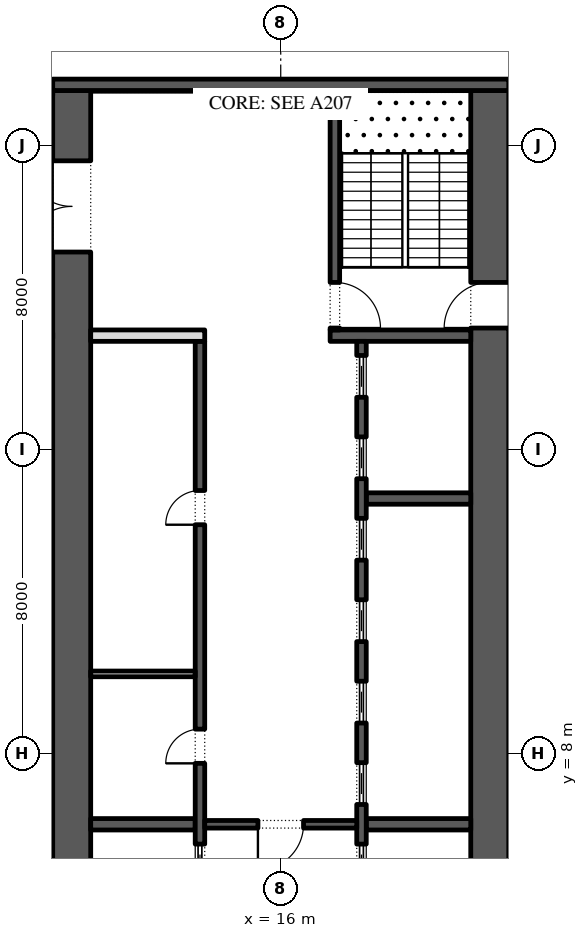
"""IFC4 building model, lengths in metres.
Left out: names, types, materials, properties, quantities, classifications, styles, units other than length and angle.
Written with IfcOpenShell. Run it as: python <this file> out.ifc"""

import sys

from ifc_helpers import new_model, si_unit, direction, frame, frame_2d, origin, place, context, subcontext, project, spatial, rectangle, extrude, element, fill, save


model = new_model("IFC4")
c1 = context("Model", 3, precision=1e-05, world=origin(), true_north=direction((0.0, 1.0)))
c2 = subcontext(c1, "Body", "Model", "MODEL_VIEW")
j1 = project(units=[si_unit("LENGTHUNIT", "METRE"), si_unit("PLANEANGLEUNIT", "RADIAN")], contexts=[c1])
p1 = place(None, origin())
s1 = spatial("IfcSite", under=j1, at=p1, CompositionType="ELEMENT")
p2 = place(p1, origin())
s2 = spatial("IfcBuilding", under=s1, at=p2, CompositionType="ELEMENT")
p3 = place(p2, frame((0.0, 0.0, 24.0)))
s3 = spatial("IfcBuildingStorey", under=s2, at=p3, CompositionType="ELEMENT", Elevation=24.0)
p4 = place(p3, frame((21.5, -2.45, 0.0), z_axis=(0.0, 0.0, 1.0), x_axis=(0.0, 1.0, 0.0)))
e1 = element("IfcWall", 1, at=p4, inside=s3, PredefinedType="SHEAR", context=c2, shape_type="SweptSolid", body=[
    extrude(rectangle(XDim=27.9, YDim=1.0, at=frame_2d((13.95, 0.0))), origin(), (0.0, 0.0, 1.0), 4.5),
])
p5 = place(p4, frame((5.05, 0.0, 0.0)))
e2 = element("IfcOpeningElement", 2, at=p5, cuts=e1, PredefinedType="OPENING", context=c2, shape_type="SweptSolid", body=[
    extrude(rectangle(XDim=1.2, YDim=2.1, at=frame_2d((0.6, 1.05))), frame((0.0, 0.51, 0.0), z_axis=(0.0, -1.0, 0.0), x_axis=(1.0, 0.0, 0.0)), (0.0, 0.0, 1.0), 1.02),
])
p6 = place(p4, frame((21.65, 0.0, 0.0)))
e3 = element("IfcOpeningElement", 3, at=p6, cuts=e1, PredefinedType="OPENING", context=c2, shape_type="SweptSolid", body=[
    extrude(rectangle(XDim=1.2, YDim=2.1, at=frame_2d((0.6, 1.05))), frame((0.0, 0.51, 0.0), z_axis=(0.0, -1.0, 0.0), x_axis=(1.0, 0.0, 0.0)), (0.0, 0.0, 1.0), 1.02),
])
p7 = place(p3, frame((10.5, -2.45, 0.0), z_axis=(0.0, 0.0, 1.0), x_axis=(0.0, 1.0, 0.0)))
e4 = element("IfcWall", 4, at=p7, inside=s3, PredefinedType="SHEAR", context=c2, shape_type="SweptSolid", body=[
    extrude(rectangle(XDim=27.9, YDim=1.0, at=frame_2d((13.95, 0.0))), origin(), (0.0, 0.0, 1.0), 4.5),
])
p8 = place(p7, frame((23.65, 0.0, 0.0)))
e5 = element("IfcOpeningElement", 5, at=p8, cuts=e4, PredefinedType="OPENING", context=c2, shape_type="SweptSolid", body=[
    extrude(rectangle(XDim=2.4, YDim=2.1, at=frame_2d((1.2, 1.05))), frame((0.0, 0.51, 0.0), z_axis=(0.0, -1.0, 0.0), x_axis=(1.0, 0.0, 0.0)), (0.0, 0.0, 1.0), 1.02),
])
p9 = place(p7, frame((2.7, 0.0, 0.0)))
e6 = element("IfcOpeningElement", 6, at=p9, cuts=e4, PredefinedType="OPENING", context=c2, shape_type="SweptSolid", body=[
    extrude(rectangle(XDim=0.9, YDim=2.1, at=frame_2d((0.45, 1.05))), frame((0.0, 0.51, 0.0), z_axis=(0.0, -1.0, 0.0), x_axis=(1.0, 0.0, 0.0)), (0.0, 0.0, 1.0), 1.02),
])
p10 = place(p3, frame((10.0, 25.6, 0.0), z_axis=(0.0, 0.0, 1.0), x_axis=(1.0, 0.0, 0.0)))
e7 = element("IfcWall", 7, at=p10, inside=s3, PredefinedType="SHEAR", context=c2, shape_type="SweptSolid", body=[
    extrude(rectangle(XDim=12.0, YDim=0.3, at=frame_2d((6.0, 0.0))), origin(), (0.0, 0.0, 1.0), 4.5),
])
p11 = place(p3, frame((17.3, 19.0, 0.0), z_axis=(0.0, 0.0, 1.0), x_axis=(1.0, 0.0, 0.0)))
e8 = element("IfcWall", 8, at=p11, inside=s3, PredefinedType="SHEAR", context=c2, shape_type="SweptSolid", body=[
    extrude(rectangle(XDim=3.7, YDim=0.3, at=frame_2d((1.85, 0.0))), origin(), (0.0, 0.0, 1.0), 4.5),
])
p12 = place(p3, frame((17.425, 19.15, 0.0), z_axis=(0.0, 0.0, 1.0), x_axis=(0.0, 1.0, 0.0)))
e9 = element("IfcWall", 9, at=p12, inside=s3, PredefinedType="SHEAR", context=c2, shape_type="SweptSolid", body=[
    extrude(rectangle(XDim=6.3, YDim=0.25, at=frame_2d((3.15, 0.0))), origin(), (0.0, 0.0, 1.0), 4.5),
])
p13 = place(p12, frame((0.05, 0.0, 0.0)))
e10 = element("IfcOpeningElement", 10, at=p13, cuts=e9, PredefinedType="OPENING", context=c2, shape_type="SweptSolid", body=[
    extrude(rectangle(XDim=1.2, YDim=2.1, at=frame_2d((0.6, 1.05))), frame((0.0, 0.135, 0.0), z_axis=(0.0, -1.0, 0.0), x_axis=(1.0, 0.0, 0.0)), (0.0, 0.0, 1.0), 0.27),
])
for number, where, z_axis, x_axis in (
    (11, (18.25, 6.143, 0.0), (0.0, 0.0, 1.0), (1.0, 0.0, 0.0)),
    (12, (18.25, 14.714, 0.0), (0.0, 0.0, 1.0), (1.0, 0.0, 0.0)),
):
    element("IfcWall", number, at=place(p3, frame(where, z_axis=z_axis, x_axis=x_axis)), inside=s3, PredefinedType="SHEAR", context=c2, shape_type="SweptSolid", body=[
        extrude(rectangle(XDim=2.75, YDim=0.3, at=frame_2d((1.375, 0.0))), origin(), (0.0, 0.0, 1.0), 4.5),
    ])
p14 = place(p3, frame((18.125, 4.15, 0.0), z_axis=(0.0, 0.0, 1.0), x_axis=(0.0, 1.0, 0.0)))
e13 = element("IfcWall", 13, at=p14, inside=s3, PredefinedType="SHEAR", context=c2, shape_type="SweptSolid", body=[
    extrude(rectangle(XDim=14.7, YDim=0.25, at=frame_2d((7.35, 0.0))), origin(), (0.0, 0.0, 1.0), 4.5),
])
p15 = place(p14, frame((0.371, 0.0, 0.0)))
e14 = element("IfcOpeningElement", 14, at=p15, cuts=e13, PredefinedType="OPENING", context=c2, shape_type="SweptSolid", body=[
    extrude(rectangle(XDim=1.1, YDim=2.1, at=frame_2d((0.55, 1.05))), frame((0.0, 0.135, 0.0), z_axis=(0.0, -1.0, 0.0), x_axis=(1.0, 0.0, 0.0)), (0.0, 0.0, 1.0), 0.27),
])
p16 = place(p14, frame((2.514, 0.0, 0.0)))
e15 = element("IfcOpeningElement", 15, at=p16, cuts=e13, PredefinedType="OPENING", context=c2, shape_type="SweptSolid", body=[
    extrude(rectangle(XDim=1.1, YDim=2.1, at=frame_2d((0.55, 1.05))), frame((0.0, 0.135, 0.0), z_axis=(0.0, -1.0, 0.0), x_axis=(1.0, 0.0, 0.0)), (0.0, 0.0, 1.0), 0.27),
])
p17 = place(p14, frame((4.657, 0.0, 0.0)))
e16 = element("IfcOpeningElement", 16, at=p17, cuts=e13, PredefinedType="OPENING", context=c2, shape_type="SweptSolid", body=[
    extrude(rectangle(XDim=1.1, YDim=2.1, at=frame_2d((0.55, 1.05))), frame((0.0, 0.135, 0.0), z_axis=(0.0, -1.0, 0.0), x_axis=(1.0, 0.0, 0.0)), (0.0, 0.0, 1.0), 0.27),
])
p18 = place(p14, frame((6.8, 0.0, 0.0)))
e17 = element("IfcOpeningElement", 17, at=p18, cuts=e13, PredefinedType="OPENING", context=c2, shape_type="SweptSolid", body=[
    extrude(rectangle(XDim=1.1, YDim=2.1, at=frame_2d((0.55, 1.05))), frame((0.0, 0.135, 0.0), z_axis=(0.0, -1.0, 0.0), x_axis=(1.0, 0.0, 0.0)), (0.0, 0.0, 1.0), 0.27),
])
p19 = place(p14, frame((8.943, 0.0, 0.0)))
e18 = element("IfcOpeningElement", 18, at=p19, cuts=e13, PredefinedType="OPENING", context=c2, shape_type="SweptSolid", body=[
    extrude(rectangle(XDim=1.1, YDim=2.1, at=frame_2d((0.55, 1.05))), frame((0.0, 0.135, 0.0), z_axis=(0.0, -1.0, 0.0), x_axis=(1.0, 0.0, 0.0)), (0.0, 0.0, 1.0), 0.27),
])
p20 = place(p14, frame((11.086, 0.0, 0.0)))
e19 = element("IfcOpeningElement", 19, at=p20, cuts=e13, PredefinedType="OPENING", context=c2, shape_type="SweptSolid", body=[
    extrude(rectangle(XDim=1.1, YDim=2.1, at=frame_2d((0.55, 1.05))), frame((0.0, 0.135, 0.0), z_axis=(0.0, -1.0, 0.0), x_axis=(1.0, 0.0, 0.0)), (0.0, 0.0, 1.0), 0.27),
])
p21 = place(p14, frame((13.229, 0.0, 0.0)))
e20 = element("IfcOpeningElement", 20, at=p21, cuts=e13, PredefinedType="OPENING", context=c2, shape_type="SweptSolid", body=[
    extrude(rectangle(XDim=1.1, YDim=2.1, at=frame_2d((0.55, 1.05))), frame((0.0, 0.135, 0.0), z_axis=(0.0, -1.0, 0.0), x_axis=(1.0, 0.0, 0.0)), (0.0, 0.0, 1.0), 0.27),
])
p22 = place(p3, frame((11.0, 6.143, 0.0), z_axis=(0.0, 0.0, 1.0), x_axis=(1.0, 0.0, 0.0)))
e21 = element("IfcWall", 21, at=p22, inside=s3, PredefinedType="SHEAR", context=c2, shape_type="SweptSolid", body=[
    extrude(rectangle(XDim=2.75, YDim=0.3, at=frame_2d((1.375, 0.0))), origin(), (0.0, 0.0, 1.0), 4.5),
])
p23 = place(p3, frame((13.875, -2.45, 0.0), z_axis=(0.0, 0.0, 1.0), x_axis=(0.0, 1.0, 0.0)))
e22 = element("IfcWall", 22, at=p23, inside=s3, PredefinedType="SHEAR", context=c2, shape_type="SweptSolid", body=[
    extrude(rectangle(XDim=21.3, YDim=0.25, at=frame_2d((10.65, 0.0))), origin(), (0.0, 0.0, 1.0), 4.5),
])
p24 = place(p23, frame((10.196, 0.0, 0.0)))
e23 = element("IfcOpeningElement", 23, at=p24, cuts=e22, PredefinedType="OPENING", context=c2, shape_type="SweptSolid", body=[
    extrude(rectangle(XDim=0.9, YDim=2.1, at=frame_2d((0.45, 1.05))), frame((0.0, 0.135, 0.0), z_axis=(0.0, -1.0, 0.0), x_axis=(1.0, 0.0, 0.0)), (0.0, 0.0, 1.0), 0.27),
])
p25 = place(p23, frame((16.475, 0.0, 0.0)))
e24 = element("IfcOpeningElement", 24, at=p25, cuts=e22, PredefinedType="OPENING", context=c2, shape_type="SweptSolid", body=[
    extrude(rectangle(XDim=0.9, YDim=2.1, at=frame_2d((0.45, 1.05))), frame((0.0, 0.135, 0.0), z_axis=(0.0, -1.0, 0.0), x_axis=(1.0, 0.0, 0.0)), (0.0, 0.0, 1.0), 0.27),
])
p26 = place(p23, frame((6.971, 0.0, 0.0)))
e25 = element("IfcOpeningElement", 25, at=p26, cuts=e22, PredefinedType="OPENING", context=c2, shape_type="SweptSolid", body=[
    extrude(rectangle(XDim=1.1, YDim=2.1, at=frame_2d((0.55, 1.05))), frame((0.0, 0.135, 0.0), z_axis=(0.0, -1.0, 0.0), x_axis=(1.0, 0.0, 0.0)), (0.0, 0.0, 1.0), 0.27),
])
p27 = place(p3, frame((11.0, 19.0, 0.0), z_axis=(0.0, 0.0, 1.0), x_axis=(1.0, 0.0, 0.0)))
e26 = element("IfcWall", 26, at=p27, inside=s3, PredefinedType="PARTITIONING", context=c2, shape_type="SweptSolid", body=[
    extrude(rectangle(XDim=3.0, YDim=0.3, at=frame_2d((1.5, 0.0))), origin(), (0.0, 0.0, 1.0), 4.5),
])
p28 = place(p3, frame((11.0, 10.1, 0.0), z_axis=(0.0, 0.0, 1.0), x_axis=(1.0, 0.0, 0.0)))
e27 = element("IfcWall", 27, at=p28, inside=s3, PredefinedType="PARTITIONING", context=c2, shape_type="SweptSolid", body=[
    extrude(rectangle(XDim=2.75, YDim=0.15, at=frame_2d((1.375, 0.0))), origin(), (0.0, 0.0, 1.0), 4.5),
])
p29 = place(p3, frame((14.0, 6.143, 0.0), z_axis=(0.0, 0.0, 1.0), x_axis=(1.0, 0.0, 0.0)))
e28 = element("IfcWall", 28, at=p29, inside=s3, PredefinedType="SHEAR", context=c2, shape_type="SweptSolid", body=[
    extrude(rectangle(XDim=4.0, YDim=0.2, at=frame_2d((2.0, 0.0))), origin(), (0.0, 0.0, 1.0), 4.5),
])
p30 = place(p29, frame((1.4, 0.0, 0.0)))
e29 = element("IfcOpeningElement", 29, at=p30, cuts=e28, PredefinedType="OPENING", context=c2, shape_type="SweptSolid", body=[
    extrude(rectangle(XDim=1.2, YDim=2.1, at=frame_2d((0.6, 1.05))), frame((0.0, 0.11, 0.0), z_axis=(0.0, -1.0, 0.0), x_axis=(1.0, 0.0, 0.0)), (0.0, 0.0, 1.0), 0.22),
])
p31 = place(p15, origin())
e30 = element("IfcDoor", 30, at=p31, inside=s3, OperationType="SLIDING_TO_LEFT", PredefinedType="DOOR", context=c2, shape_type="SweptSolid", body=[
    extrude(rectangle(XDim=1.1, YDim=2.1, at=frame_2d((0.55, 1.05))), frame((0.0, 0.025, 0.0), z_axis=(0.0, -1.0, 0.0), x_axis=(1.0, 0.0, 0.0)), (0.0, 0.0, 1.0), 0.05),
])
fill(e14, e30)
p32 = place(p16, origin())
e31 = element("IfcDoor", 31, at=p32, inside=s3, OperationType="SLIDING_TO_LEFT", PredefinedType="DOOR", context=c2, shape_type="SweptSolid", body=[
    extrude(rectangle(XDim=1.1, YDim=2.1, at=frame_2d((0.55, 1.05))), frame((0.0, 0.025, 0.0), z_axis=(0.0, -1.0, 0.0), x_axis=(1.0, 0.0, 0.0)), (0.0, 0.0, 1.0), 0.05),
])
fill(e15, e31)
p33 = place(p17, origin())
e32 = element("IfcDoor", 32, at=p33, inside=s3, OperationType="SLIDING_TO_LEFT", PredefinedType="DOOR", context=c2, shape_type="SweptSolid", body=[
    extrude(rectangle(XDim=1.1, YDim=2.1, at=frame_2d((0.55, 1.05))), frame((0.0, 0.025, 0.0), z_axis=(0.0, -1.0, 0.0), x_axis=(1.0, 0.0, 0.0)), (0.0, 0.0, 1.0), 0.05),
])
fill(e16, e32)
p34 = place(p18, origin())
e33 = element("IfcDoor", 33, at=p34, inside=s3, OperationType="SLIDING_TO_LEFT", PredefinedType="DOOR", context=c2, shape_type="SweptSolid", body=[
    extrude(rectangle(XDim=1.1, YDim=2.1, at=frame_2d((0.55, 1.05))), frame((0.0, 0.025, 0.0), z_axis=(0.0, -1.0, 0.0), x_axis=(1.0, 0.0, 0.0)), (0.0, 0.0, 1.0), 0.05),
])
fill(e17, e33)
p35 = place(p19, origin())
e34 = element("IfcDoor", 34, at=p35, inside=s3, OperationType="SLIDING_TO_LEFT", PredefinedType="DOOR", context=c2, shape_type="SweptSolid", body=[
    extrude(rectangle(XDim=1.1, YDim=2.1, at=frame_2d((0.55, 1.05))), frame((0.0, 0.025, 0.0), z_axis=(0.0, -1.0, 0.0), x_axis=(1.0, 0.0, 0.0)), (0.0, 0.0, 1.0), 0.05),
])
fill(e18, e34)
p36 = place(p20, origin())
e35 = element("IfcDoor", 35, at=p36, inside=s3, OperationType="SLIDING_TO_LEFT", PredefinedType="DOOR", context=c2, shape_type="SweptSolid", body=[
    extrude(rectangle(XDim=1.1, YDim=2.1, at=frame_2d((0.55, 1.05))), frame((0.0, 0.025, 0.0), z_axis=(0.0, -1.0, 0.0), x_axis=(1.0, 0.0, 0.0)), (0.0, 0.0, 1.0), 0.05),
])
fill(e19, e35)
p37 = place(p21, origin())
e36 = element("IfcDoor", 36, at=p37, inside=s3, OperationType="SLIDING_TO_LEFT", PredefinedType="DOOR", context=c2, shape_type="SweptSolid", body=[
    extrude(rectangle(XDim=1.1, YDim=2.1, at=frame_2d((0.55, 1.05))), frame((0.0, 0.025, 0.0), z_axis=(0.0, -1.0, 0.0), x_axis=(1.0, 0.0, 0.0)), (0.0, 0.0, 1.0), 0.05),
])
fill(e20, e36)
p38 = place(p24, origin())
e37 = element("IfcDoor", 37, at=p38, inside=s3, OperationType="SINGLE_SWING_RIGHT", PredefinedType="DOOR", context=c2, shape_type="SweptSolid", body=[
    extrude(rectangle(XDim=0.9, YDim=2.1, at=frame_2d((0.45, 1.05))), frame((0.0, 0.125, 0.0), z_axis=(0.0, -1.0, 0.0), x_axis=(1.0, 0.0, 0.0)), (0.0, 0.0, 1.0), 0.05),
])
fill(e23, e37)
p39 = place(p25, origin())
e38 = element("IfcDoor", 38, at=p39, inside=s3, OperationType="SINGLE_SWING_RIGHT", PredefinedType="DOOR", context=c2, shape_type="SweptSolid", body=[
    extrude(rectangle(XDim=0.9, YDim=2.1, at=frame_2d((0.45, 1.05))), frame((0.0, 0.125, 0.0), z_axis=(0.0, -1.0, 0.0), x_axis=(1.0, 0.0, 0.0)), (0.0, 0.0, 1.0), 0.05),
])
fill(e24, e38)
p40 = place(p26, origin())
e39 = element("IfcDoor", 39, at=p40, inside=s3, OperationType="SLIDING_TO_LEFT", PredefinedType="DOOR", context=c2, shape_type="SweptSolid", body=[
    extrude(rectangle(XDim=1.1, YDim=2.1, at=frame_2d((0.55, 1.05))), frame((0.0, 0.025, 0.0), z_axis=(0.0, -1.0, 0.0), x_axis=(1.0, 0.0, 0.0)), (0.0, 0.0, 1.0), 0.05),
])
fill(e25, e39)
p41 = place(p30, frame((1.2, 0.0, 0.0), z_axis=(0.0, 0.0, 1.0), x_axis=(-1.0, 0.0, 0.0)))
e40 = element("IfcDoor", 40, at=p41, inside=s3, OperationType="SINGLE_SWING_LEFT", PredefinedType="DOOR", context=c2, shape_type="SweptSolid", body=[
    extrude(rectangle(XDim=1.2, YDim=2.1, at=frame_2d((0.6, 1.05))), frame((0.0, 0.025, 0.0), z_axis=(0.0, -1.0, 0.0), x_axis=(1.0, 0.0, 0.0)), (0.0, 0.0, 1.0), 0.05),
])
fill(e29, e40)
p42 = place(p8, origin())
e41 = element("IfcDoor", 41, at=p42, inside=s3, OperationType="DOUBLE_DOOR_SINGLE_SWING", PredefinedType="DOOR", context=c2, shape_type="SweptSolid", body=[
    extrude(rectangle(XDim=2.4, YDim=2.1, at=frame_2d((1.2, 1.05))), frame((0.0, 0.025, 0.0), z_axis=(0.0, -1.0, 0.0), x_axis=(1.0, 0.0, 0.0)), (0.0, 0.0, 1.0), 0.05),
])
fill(e5, e41)
p43 = place(p13, frame((1.2, 0.0, 0.0), z_axis=(0.0, 0.0, 1.0), x_axis=(-1.0, 0.0, 0.0)))
e42 = element("IfcDoor", 42, at=p43, inside=s3, OperationType="SINGLE_SWING_LEFT", PredefinedType="DOOR", context=c2, shape_type="SweptSolid", body=[
    extrude(rectangle(XDim=1.2, YDim=2.1, at=frame_2d((0.6, 1.05))), frame((0.0, 0.025, 0.0), z_axis=(0.0, -1.0, 0.0), x_axis=(1.0, 0.0, 0.0)), (0.0, 0.0, 1.0), 0.05),
])
fill(e10, e42)
p44 = place(p6, origin())
e43 = element("IfcDoor", 43, at=p44, inside=s3, OperationType="SINGLE_SWING_RIGHT", PredefinedType="DOOR", context=c2, shape_type="SweptSolid", body=[
    extrude(rectangle(XDim=1.2, YDim=2.1, at=frame_2d((0.6, 1.05))), frame((0.0, 0.025, 0.0), z_axis=(0.0, -1.0, 0.0), x_axis=(1.0, 0.0, 0.0)), (0.0, 0.0, 1.0), 0.05),
])
fill(e3, e43)
save(model, sys.argv[1])
